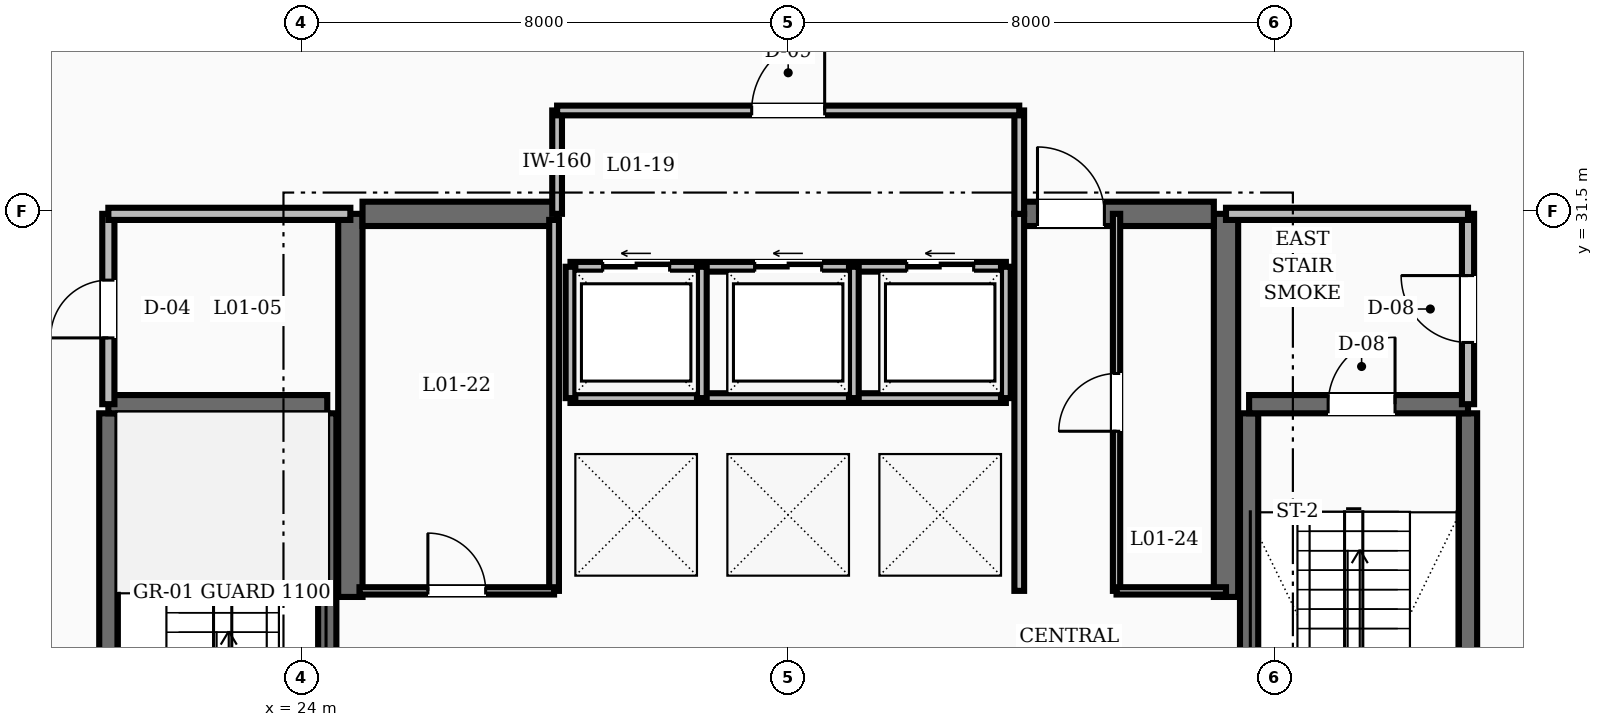
"""IFC4 building model, lengths in metres.
Left out: names, types, materials, properties, quantities, classifications, styles, units other than length and angle.
Written with IfcOpenShell. Run it as: python <this file> out.ifc"""

import sys

from ifc_helpers import new_model, si_unit, direction, frame, frame_2d, origin, place, context, subcontext, project, spatial, rectangle, extrude, element, fill, save


model = new_model("IFC4")
c1 = context("Model", 3, precision=1e-05, world=origin(), true_north=direction((0.0, 1.0)))
c2 = subcontext(c1, "Body", "Model", "MODEL_VIEW")
j1 = project(units=[si_unit("LENGTHUNIT", "METRE"), si_unit("PLANEANGLEUNIT", "RADIAN")], contexts=[c1])
p1 = place(None, origin())
s1 = spatial("IfcSite", under=j1, at=p1, CompositionType="ELEMENT")
p2 = place(p1, origin())
s2 = spatial("IfcBuilding", under=s1, at=p2, CompositionType="ELEMENT")
p3 = place(p2, frame((0.0, 0.0, 5.2)))
s3 = spatial("IfcBuildingStorey", under=s2, at=p3, CompositionType="ELEMENT", Elevation=5.2)
for number, where, z_axis, x_axis in (
    (1, (24.8, 25.15, 0.0), (0.0, 0.0, 1.0), (0.0, 1.0, 0.0)),
    (2, (39.2, 25.15, 0.0), (0.0, 0.0, 1.0), (0.0, 1.0, 0.0)),
):
    element("IfcWall", number, at=place(p3, frame(where, z_axis=z_axis, x_axis=x_axis)), inside=s3, PredefinedType="SHEAR", context=c2, shape_type="SweptSolid", body=[
        extrude(rectangle(XDim=6.3, YDim=0.4, at=frame_2d((3.15, 0.0))), origin(), (0.0, 0.0, 1.0), 4.8),
    ])
p4 = place(p3, frame((25.0, 31.45, 0.0), z_axis=(0.0, 0.0, 1.0), x_axis=(1.0, 0.0, 0.0)))
e3 = element("IfcWall", 3, at=p4, inside=s3, PredefinedType="SHEAR", context=c2, shape_type="SweptSolid", body=[
    extrude(rectangle(XDim=3.2, YDim=0.4, at=frame_2d((1.6, 0.0))), origin(), (0.0, 0.0, 1.0), 4.8),
])
p5 = place(p3, frame((35.8, 31.45, 0.0), z_axis=(0.0, 0.0, 1.0), x_axis=(1.0, 0.0, 0.0)))
e4 = element("IfcWall", 4, at=p5, inside=s3, PredefinedType="SHEAR", context=c2, shape_type="SweptSolid", body=[
    extrude(rectangle(XDim=3.2, YDim=0.4, at=frame_2d((1.6, 0.0))), origin(), (0.0, 0.0, 1.0), 4.8),
])
p6 = place(p5, frame((0.3, 0.0, 0.0)))
e5 = element("IfcOpeningElement", 5, at=p6, cuts=e4, PredefinedType="OPENING", context=c2, shape_type="SweptSolid", body=[
    extrude(rectangle(XDim=1.1, YDim=2.1, at=frame_2d((0.55, 1.05))), frame((0.0, 0.21, 0.0), z_axis=(0.0, -1.0, 0.0), x_axis=(1.0, 0.0, 0.0)), (0.0, 0.0, 1.0), 0.42),
])
for number, where, z_axis, x_axis in (
    (6, (20.82, 19.43, 0.0), (0.0, 0.0, 1.0), (0.0, 1.0, 0.0)),
    (7, (24.42, 19.43, 0.0), (0.0, 0.0, 1.0), (0.0, 1.0, 0.0)),
):
    element("IfcWall", number, at=place(p3, frame(where, z_axis=z_axis, x_axis=x_axis)), inside=s3, PredefinedType="SHEAR", context=c2, shape_type="SweptSolid", body=[
        extrude(rectangle(XDim=8.74, YDim=0.3, at=frame_2d((4.37, 0.0))), origin(), (0.0, 0.0, 1.0), 4.8),
    ])
p7 = place(p3, frame((20.82, 28.32, 0.0), z_axis=(0.0, 0.0, 1.0), x_axis=(1.0, 0.0, 0.0)))
e8 = element("IfcWall", 8, at=p7, inside=s3, PredefinedType="SHEAR", context=c2, shape_type="SweptSolid", body=[
    extrude(rectangle(XDim=3.6, YDim=0.3, at=frame_2d((1.8, 0.0))), origin(), (0.0, 0.0, 1.0), 4.8),
])
for number, where, z_axis, x_axis in (
    (9, (43.18, 19.43, 0.0), (0.0, 0.0, 1.0), (0.0, 1.0, 0.0)),
    (10, (39.58, 19.43, 0.0), (0.0, 0.0, 1.0), (0.0, 1.0, 0.0)),
):
    element("IfcWall", number, at=place(p3, frame(where, z_axis=z_axis, x_axis=x_axis)), inside=s3, PredefinedType="SHEAR", context=c2, shape_type="SweptSolid", body=[
        extrude(rectangle(XDim=8.74, YDim=0.3, at=frame_2d((4.37, 0.0))), origin(), (0.0, 0.0, 1.0), 4.8),
    ])
p8 = place(p3, frame((39.58, 28.32, 0.0), z_axis=(0.0, 0.0, 1.0), x_axis=(1.0, 0.0, 0.0)))
e11 = element("IfcWall", 11, at=p8, inside=s3, PredefinedType="SHEAR", context=c2, shape_type="SweptSolid", body=[
    extrude(rectangle(XDim=3.6, YDim=0.3, at=frame_2d((1.8, 0.0))), origin(), (0.0, 0.0, 1.0), 4.8),
])
p9 = place(p8, frame((1.3, 0.0, 0.0)))
e12 = element("IfcOpeningElement", 12, at=p9, cuts=e11, PredefinedType="OPENING", context=c2, shape_type="SweptSolid", body=[
    extrude(rectangle(XDim=1.1, YDim=2.1, at=frame_2d((0.55, 1.05))), frame((0.0, 0.16, 0.0), z_axis=(0.0, -1.0, 0.0), x_axis=(1.0, 0.0, 0.0)), (0.0, 0.0, 1.0), 0.32),
])
p10 = place(p3, frame((43.18, 28.32, 0.0), z_axis=(0.0, 0.0, 1.0), x_axis=(0.0, 1.0, 0.0)))
e13 = element("IfcWall", 13, at=p10, inside=s3, PredefinedType="SOLIDWALL", context=c2, shape_type="SweptSolid", body=[
    extrude(rectangle(XDim=3.13, YDim=0.2, at=frame_2d((1.565, 0.0))), origin(), (0.0, 0.0, 1.0), 3.52),
])
p11 = place(p10, frame((1.015, 0.0, 0.0)))
e14 = element("IfcOpeningElement", 14, at=p11, cuts=e13, PredefinedType="OPENING", context=c2, shape_type="SweptSolid", body=[
    extrude(rectangle(XDim=1.1, YDim=2.1, at=frame_2d((0.55, 1.05))), frame((0.0, 0.11, 0.0), z_axis=(0.0, -1.0, 0.0), x_axis=(1.0, 0.0, 0.0)), (0.0, 0.0, 1.0), 0.22),
])
p12 = place(p3, frame((39.2, 31.45, 0.0), z_axis=(0.0, 0.0, 1.0), x_axis=(1.0, 0.0, 0.0)))
e15 = element("IfcWall", 15, at=p12, inside=s3, PredefinedType="SOLIDWALL", context=c2, shape_type="SweptSolid", body=[
    extrude(rectangle(XDim=3.98, YDim=0.2, at=frame_2d((1.99, 0.0))), origin(), (0.0, 0.0, 1.0), 3.52),
])
p13 = place(p3, frame((20.82, 28.32, 0.0), z_axis=(0.0, 0.0, 1.0), x_axis=(0.0, 1.0, 0.0)))
e16 = element("IfcWall", 16, at=p13, inside=s3, PredefinedType="SOLIDWALL", context=c2, shape_type="SweptSolid", body=[
    extrude(rectangle(XDim=3.13, YDim=0.2, at=frame_2d((1.565, 0.0))), origin(), (0.0, 0.0, 1.0), 3.52),
])
p14 = place(p13, frame((1.09, 0.0, 0.0)))
e17 = element("IfcOpeningElement", 17, at=p14, cuts=e16, PredefinedType="OPENING", context=c2, shape_type="SweptSolid", body=[
    extrude(rectangle(XDim=0.95, YDim=2.1, at=frame_2d((0.475, 1.05))), frame((0.0, 0.11, 0.0), z_axis=(0.0, -1.0, 0.0), x_axis=(1.0, 0.0, 0.0)), (0.0, 0.0, 1.0), 0.22),
])
p15 = place(p3, frame((20.82, 31.45, 0.0), z_axis=(0.0, 0.0, 1.0), x_axis=(1.0, 0.0, 0.0)))
e18 = element("IfcWall", 18, at=p15, inside=s3, PredefinedType="SOLIDWALL", context=c2, shape_type="SweptSolid", body=[
    extrude(rectangle(XDim=3.98, YDim=0.2, at=frame_2d((1.99, 0.0))), origin(), (0.0, 0.0, 1.0), 3.52),
])
p16 = place(p3, frame((35.8, 25.25, 0.0), z_axis=(0.0, 0.0, 1.0), x_axis=(0.0, 1.0, 0.0)))
e19 = element("IfcWall", 19, at=p16, inside=s3, PredefinedType="SOLIDWALL", context=c2, shape_type="SweptSolid", body=[
    extrude(rectangle(XDim=6.2, YDim=0.16, at=frame_2d((3.1, 0.0))), origin(), (0.0, 0.0, 1.0), 3.52),
])
p17 = place(p3, frame((28.42, 30.58, 0.0), z_axis=(0.0, 0.0, 1.0), x_axis=(1.0, 0.0, 0.0)))
e20 = element("IfcWall", 20, at=p17, inside=s3, PredefinedType="SOLIDWALL", context=c2, shape_type="SweptSolid", body=[
    extrude(rectangle(XDim=7.16, YDim=0.16, at=frame_2d((3.58, 0.0))), origin(), (0.0, 0.0, 1.0), 3.52),
])
p18 = place(p17, frame((0.53, 0.0, 0.0)))
e21 = element("IfcOpeningElement", 21, at=p18, cuts=e20, PredefinedType="OPENING", context=c2, shape_type="SweptSolid", body=[
    extrude(rectangle(XDim=1.1, YDim=2.15, at=frame_2d((0.55, 1.075))), frame((0.0, 0.09, 0.0), z_axis=(0.0, -1.0, 0.0), x_axis=(1.0, 0.0, 0.0)), (0.0, 0.0, 1.0), 0.18),
])
p19 = place(p17, frame((3.03, 0.0, 0.0)))
e22 = element("IfcOpeningElement", 22, at=p19, cuts=e20, PredefinedType="OPENING", context=c2, shape_type="SweptSolid", body=[
    extrude(rectangle(XDim=1.1, YDim=2.15, at=frame_2d((0.55, 1.075))), frame((0.0, 0.09, 0.0), z_axis=(0.0, -1.0, 0.0), x_axis=(1.0, 0.0, 0.0)), (0.0, 0.0, 1.0), 0.18),
])
p20 = place(p17, frame((5.53, 0.0, 0.0)))
e23 = element("IfcOpeningElement", 23, at=p20, cuts=e20, PredefinedType="OPENING", context=c2, shape_type="SweptSolid", body=[
    extrude(rectangle(XDim=1.1, YDim=2.15, at=frame_2d((0.55, 1.075))), frame((0.0, 0.09, 0.0), z_axis=(0.0, -1.0, 0.0), x_axis=(1.0, 0.0, 0.0)), (0.0, 0.0, 1.0), 0.18),
])
p21 = place(p3, frame((28.42, 28.42, 0.0), z_axis=(0.0, 0.0, 1.0), x_axis=(1.0, 0.0, 0.0)))
e24 = element("IfcWall", 24, at=p21, inside=s3, PredefinedType="SOLIDWALL", context=c2, shape_type="SweptSolid", body=[
    extrude(rectangle(XDim=7.16, YDim=0.16, at=frame_2d((3.58, 0.0))), origin(), (0.0, 0.0, 1.0), 3.52),
])
for number, where, z_axis, x_axis in (
    (25, (28.42, 28.42, 0.0), (0.0, 0.0, 1.0), (0.0, 1.0, 0.0)),
    (26, (30.58, 28.42, 0.0), (0.0, 0.0, 1.0), (0.0, 1.0, 0.0)),
    (27, (33.08, 28.42, 0.0), (0.0, 0.0, 1.0), (0.0, 1.0, 0.0)),
    (28, (35.58, 28.42, 0.0), (0.0, 0.0, 1.0), (0.0, 1.0, 0.0)),
):
    element("IfcWall", number, at=place(p3, frame(where, z_axis=z_axis, x_axis=x_axis)), inside=s3, PredefinedType="SOLIDWALL", context=c2, shape_type="SweptSolid", body=[
        extrude(rectangle(XDim=2.16, YDim=0.16, at=frame_2d((1.08, 0.0))), origin(), (0.0, 0.0, 1.0), 3.52),
    ])
for number, where, z_axis, x_axis in (
    (29, (28.2, 31.45, 0.0), (0.0, 0.0, 1.0), (0.0, 1.0, 0.0)),
    (30, (35.8, 31.45, 0.0), (0.0, 0.0, 1.0), (0.0, 1.0, 0.0)),
):
    element("IfcWall", number, at=place(p3, frame(where, z_axis=z_axis, x_axis=x_axis)), inside=s3, PredefinedType="SOLIDWALL", context=c2, shape_type="SweptSolid", body=[
        extrude(rectangle(XDim=1.7, YDim=0.16, at=frame_2d((0.85, 0.0))), origin(), (0.0, 0.0, 1.0), 3.52),
    ])
p22 = place(p3, frame((28.2, 33.15, 0.0), z_axis=(0.0, 0.0, 1.0), x_axis=(1.0, 0.0, 0.0)))
e31 = element("IfcWall", 31, at=p22, inside=s3, PredefinedType="SOLIDWALL", context=c2, shape_type="SweptSolid", body=[
    extrude(rectangle(XDim=7.6, YDim=0.16, at=frame_2d((3.8, 0.0))), origin(), (0.0, 0.0, 1.0), 3.52),
])
p23 = place(p22, frame((3.2, 0.0, 0.0)))
e32 = element("IfcOpeningElement", 32, at=p23, cuts=e31, PredefinedType="OPENING", context=c2, shape_type="SweptSolid", body=[
    extrude(rectangle(XDim=1.2, YDim=2.1, at=frame_2d((0.6, 1.05))), frame((0.0, 0.09, 0.0), z_axis=(0.0, -1.0, 0.0), x_axis=(1.0, 0.0, 0.0)), (0.0, 0.0, 1.0), 0.18),
])
p24 = place(p3, frame((28.15, 25.25, 0.0), z_axis=(0.0, 0.0, 1.0), x_axis=(0.0, 1.0, 0.0)))
e33 = element("IfcWall", 33, at=p24, inside=s3, PredefinedType="SOLIDWALL", context=c2, shape_type="SweptSolid", body=[
    extrude(rectangle(XDim=6.1, YDim=0.16, at=frame_2d((3.05, 0.0))), origin(), (0.0, 0.0, 1.0), 3.52),
])
p25 = place(p3, frame((24.95, 25.25, 0.0), z_axis=(0.0, 0.0, 1.0), x_axis=(1.0, 0.0, 0.0)))
e34 = element("IfcWall", 34, at=p25, inside=s3, PredefinedType="PARTITIONING", context=c2, shape_type="SweptSolid", body=[
    extrude(rectangle(XDim=3.2, YDim=0.12, at=frame_2d((1.6, 0.0))), origin(), (0.0, 0.0, 1.0), 3.52),
])
p26 = place(p25, frame((1.125, 0.0, 0.0)))
e35 = element("IfcOpeningElement", 35, at=p26, cuts=e34, PredefinedType="OPENING", context=c2, shape_type="SweptSolid", body=[
    extrude(rectangle(XDim=0.95, YDim=2.1, at=frame_2d((0.475, 1.05))), frame((0.0, 0.07, 0.0), z_axis=(0.0, -1.0, 0.0), x_axis=(1.0, 0.0, 0.0)), (0.0, 0.0, 1.0), 0.14),
])
p27 = place(p3, frame((37.4, 25.25, 0.0), z_axis=(0.0, 0.0, 1.0), x_axis=(0.0, 1.0, 0.0)))
e36 = element("IfcWall", 36, at=p27, inside=s3, PredefinedType="PARTITIONING", context=c2, shape_type="SweptSolid", body=[
    extrude(rectangle(XDim=6.2, YDim=0.12, at=frame_2d((3.1, 0.0))), origin(), (0.0, 0.0, 1.0), 3.52),
])
p28 = place(p27, frame((2.625, 0.0, 0.0)))
e37 = element("IfcOpeningElement", 37, at=p28, cuts=e36, PredefinedType="OPENING", context=c2, shape_type="SweptSolid", body=[
    extrude(rectangle(XDim=0.95, YDim=2.1, at=frame_2d((0.475, 1.05))), frame((0.0, 0.07, 0.0), z_axis=(0.0, -1.0, 0.0), x_axis=(1.0, 0.0, 0.0)), (0.0, 0.0, 1.0), 0.14),
])
p29 = place(p3, frame((37.4, 25.25, 0.0), z_axis=(0.0, 0.0, 1.0), x_axis=(1.0, 0.0, 0.0)))
e38 = element("IfcWall", 38, at=p29, inside=s3, PredefinedType="PARTITIONING", context=c2, shape_type="SweptSolid", body=[
    extrude(rectangle(XDim=1.8, YDim=0.12, at=frame_2d((0.9, 0.0))), origin(), (0.0, 0.0, 1.0), 3.52),
])
p30 = place(p9, origin())
e39 = element("IfcDoor", 39, at=p30, inside=s3, OperationType="SINGLE_SWING_RIGHT", PredefinedType="DOOR", context=c2, shape_type="SweptSolid", body=[
    extrude(rectangle(XDim=1.1, YDim=2.1, at=frame_2d((0.55, 1.05))), frame((0.0, 0.025, 0.0), z_axis=(0.0, -1.0, 0.0), x_axis=(1.0, 0.0, 0.0)), (0.0, 0.0, 1.0), 0.05),
])
fill(e12, e39)
p31 = place(p11, origin())
e40 = element("IfcDoor", 40, at=p31, inside=s3, OperationType="SINGLE_SWING_RIGHT", PredefinedType="DOOR", context=c2, shape_type="SweptSolid", body=[
    extrude(rectangle(XDim=1.1, YDim=2.1, at=frame_2d((0.55, 1.05))), frame((0.0, 0.025, 0.0), z_axis=(0.0, -1.0, 0.0), x_axis=(1.0, 0.0, 0.0)), (0.0, 0.0, 1.0), 0.05),
])
fill(e14, e40)
p32 = place(p14, origin())
e41 = element("IfcDoor", 41, at=p32, inside=s3, OperationType="SINGLE_SWING_LEFT", PredefinedType="DOOR", context=c2, shape_type="SweptSolid", body=[
    extrude(rectangle(XDim=0.95, YDim=2.1, at=frame_2d((0.475, 1.05))), frame((0.0, 0.025, 0.0), z_axis=(0.0, -1.0, 0.0), x_axis=(1.0, 0.0, 0.0)), (0.0, 0.0, 1.0), 0.05),
])
fill(e17, e41)
p33 = place(p6, origin())
e42 = element("IfcDoor", 42, at=p33, inside=s3, OperationType="SINGLE_SWING_LEFT", PredefinedType="DOOR", context=c2, shape_type="SweptSolid", body=[
    extrude(rectangle(XDim=1.1, YDim=2.1, at=frame_2d((0.55, 1.05))), frame((0.0, 0.025, 0.0), z_axis=(0.0, -1.0, 0.0), x_axis=(1.0, 0.0, 0.0)), (0.0, 0.0, 1.0), 0.05),
])
fill(e5, e42)
p34 = place(p18, origin())
e43 = element("IfcDoor", 43, at=p34, inside=s3, OperationType="SLIDING_TO_LEFT", PredefinedType="DOOR", context=c2, shape_type="SweptSolid", body=[
    extrude(rectangle(XDim=1.1, YDim=2.15, at=frame_2d((0.55, 1.075))), frame((0.0, 0.025, 0.0), z_axis=(0.0, -1.0, 0.0), x_axis=(1.0, 0.0, 0.0)), (0.0, 0.0, 1.0), 0.05),
])
fill(e21, e43)
p35 = place(p19, origin())
e44 = element("IfcDoor", 44, at=p35, inside=s3, OperationType="SLIDING_TO_LEFT", PredefinedType="DOOR", context=c2, shape_type="SweptSolid", body=[
    extrude(rectangle(XDim=1.1, YDim=2.15, at=frame_2d((0.55, 1.075))), frame((0.0, 0.025, 0.0), z_axis=(0.0, -1.0, 0.0), x_axis=(1.0, 0.0, 0.0)), (0.0, 0.0, 1.0), 0.05),
])
fill(e22, e44)
p36 = place(p20, origin())
e45 = element("IfcDoor", 45, at=p36, inside=s3, OperationType="SLIDING_TO_LEFT", PredefinedType="DOOR", context=c2, shape_type="SweptSolid", body=[
    extrude(rectangle(XDim=1.1, YDim=2.15, at=frame_2d((0.55, 1.075))), frame((0.0, 0.025, 0.0), z_axis=(0.0, -1.0, 0.0), x_axis=(1.0, 0.0, 0.0)), (0.0, 0.0, 1.0), 0.05),
])
fill(e23, e45)
p37 = place(p23, origin())
e46 = element("IfcDoor", 46, at=p37, inside=s3, OperationType="SINGLE_SWING_RIGHT", PredefinedType="DOOR", context=c2, shape_type="SweptSolid", body=[
    extrude(rectangle(XDim=1.2, YDim=2.1, at=frame_2d((0.6, 1.05))), frame((0.0, 0.025, 0.0), z_axis=(0.0, -1.0, 0.0), x_axis=(1.0, 0.0, 0.0)), (0.0, 0.0, 1.0), 0.05),
])
fill(e32, e46)
p38 = place(p26, origin())
e47 = element("IfcDoor", 47, at=p38, inside=s3, OperationType="SINGLE_SWING_LEFT", PredefinedType="DOOR", context=c2, shape_type="SweptSolid", body=[
    extrude(rectangle(XDim=0.95, YDim=2.1, at=frame_2d((0.475, 1.05))), frame((0.0, 0.025, 0.0), z_axis=(0.0, -1.0, 0.0), x_axis=(1.0, 0.0, 0.0)), (0.0, 0.0, 1.0), 0.05),
])
fill(e35, e47)
p39 = place(p28, origin())
e48 = element("IfcDoor", 48, at=p39, inside=s3, OperationType="SINGLE_SWING_LEFT", PredefinedType="DOOR", context=c2, shape_type="SweptSolid", body=[
    extrude(rectangle(XDim=0.95, YDim=2.1, at=frame_2d((0.475, 1.05))), frame((0.0, 0.025, 0.0), z_axis=(0.0, -1.0, 0.0), x_axis=(1.0, 0.0, 0.0)), (0.0, 0.0, 1.0), 0.05),
])
fill(e37, e48)
save(model, sys.argv[1])
